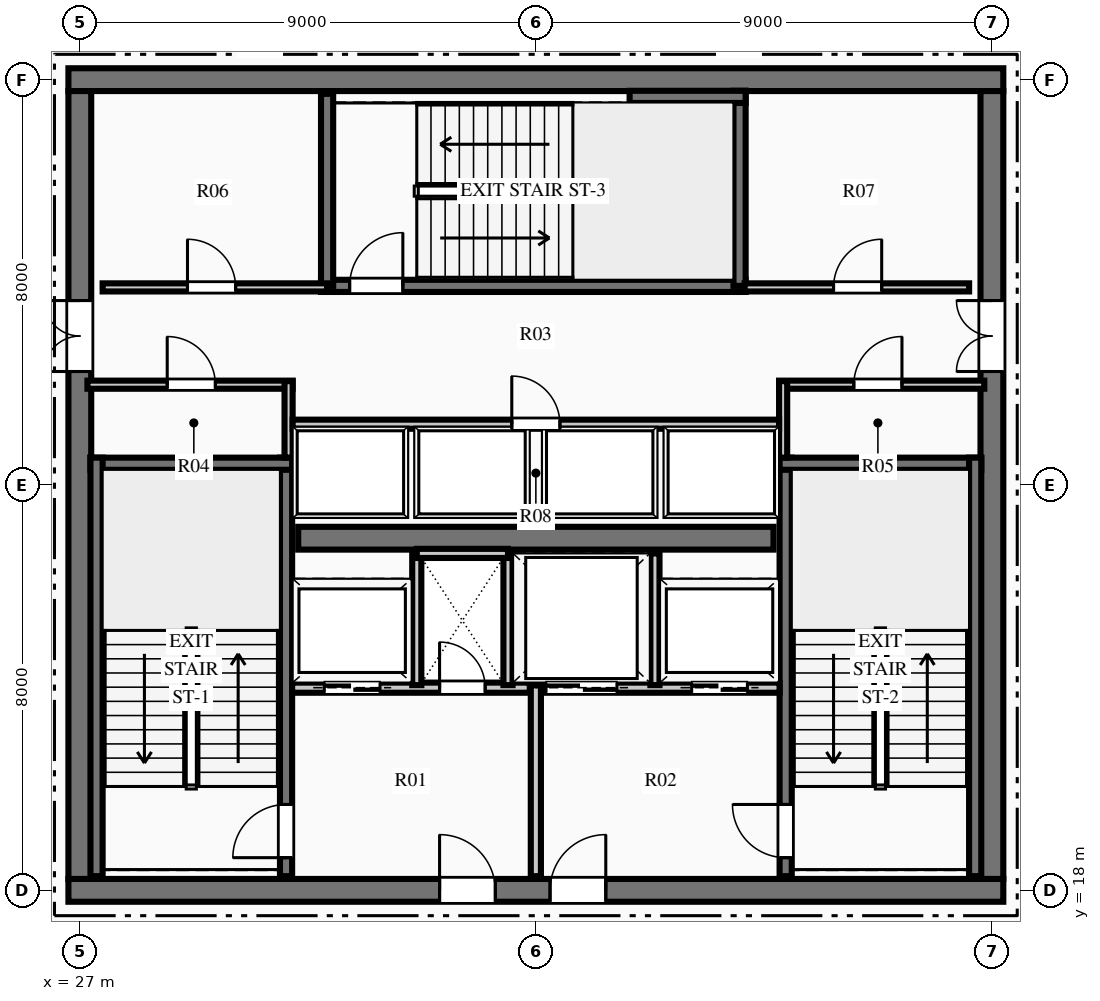
"""IFC4 building model, lengths in metres.
Left out: names, types, materials, properties, quantities, classifications, styles, units other than length and angle.
Written with IfcOpenShell. Run it as: python <this file> out.ifc"""

import sys

from ifc_helpers import new_model, si_unit, direction, frame, frame_2d, origin, place, context, subcontext, project, spatial, rectangle, extrude, element, fill, save


model = new_model("IFC4")
c1 = context("Model", 3, precision=1e-05, world=origin(), true_north=direction((0.0, 1.0)))
c2 = subcontext(c1, "Body", "Model", "MODEL_VIEW")
j1 = project(units=[si_unit("LENGTHUNIT", "METRE"), si_unit("PLANEANGLEUNIT", "RADIAN")], contexts=[c1])
p1 = place(None, origin())
s1 = spatial("IfcSite", under=j1, at=p1, CompositionType="ELEMENT")
p2 = place(p1, origin())
s2 = spatial("IfcBuilding", under=s1, at=p2, CompositionType="ELEMENT")
p3 = place(p2, frame((0.0, 0.0, 352.2)))
s3 = spatial("IfcBuildingStorey", under=s2, at=p3, CompositionType="ELEMENT", Elevation=352.2)
p4 = place(p3, frame((26.775, 18.0, 0.0), z_axis=(0.0, 0.0, 1.0), x_axis=(1.0, 0.0, 0.0)))
e1 = element("IfcWall", 1, at=p4, inside=s3, PredefinedType="SHEAR", context=c2, shape_type="SweptSolid", body=[
    extrude(rectangle(XDim=18.45, YDim=0.45, at=frame_2d((9.225, 0.0))), origin(), (0.0, 0.0, 1.0), 4.2),
])
p5 = place(p4, frame((7.325, 0.0, 0.0)))
e2 = element("IfcOpeningElement", 2, at=p5, cuts=e1, PredefinedType="OPENING", context=c2, shape_type="SweptSolid", body=[
    extrude(rectangle(XDim=1.1, YDim=2.15, at=frame_2d((0.55, 1.075))), frame((0.0, 0.235, 0.0), z_axis=(0.0, -1.0, 0.0), x_axis=(1.0, 0.0, 0.0)), (0.0, 0.0, 1.0), 0.47),
])
p6 = place(p4, frame((9.505, 0.0, 0.0)))
e3 = element("IfcOpeningElement", 3, at=p6, cuts=e1, PredefinedType="OPENING", context=c2, shape_type="SweptSolid", body=[
    extrude(rectangle(XDim=1.1, YDim=2.15, at=frame_2d((0.55, 1.075))), frame((0.0, 0.235, 0.0), z_axis=(0.0, -1.0, 0.0), x_axis=(1.0, 0.0, 0.0)), (0.0, 0.0, 1.0), 0.47),
])
p7 = place(p3, frame((26.775, 34.0, 0.0), z_axis=(0.0, 0.0, 1.0), x_axis=(1.0, 0.0, 0.0)))
e4 = element("IfcWall", 4, at=p7, inside=s3, PredefinedType="SHEAR", context=c2, shape_type="SweptSolid", body=[
    extrude(rectangle(XDim=18.45, YDim=0.45, at=frame_2d((9.225, 0.0))), origin(), (0.0, 0.0, 1.0), 4.2),
])
p8 = place(p3, frame((27.0, 18.225, 0.0), z_axis=(0.0, 0.0, 1.0), x_axis=(0.0, 1.0, 0.0)))
e5 = element("IfcWall", 5, at=p8, inside=s3, PredefinedType="SHEAR", context=c2, shape_type="SweptSolid", body=[
    extrude(rectangle(XDim=15.55, YDim=0.45, at=frame_2d((7.775, 0.0))), origin(), (0.0, 0.0, 1.0), 4.2),
])
p9 = place(p8, frame((10.015, 0.0, 0.0)))
e6 = element("IfcOpeningElement", 6, at=p9, cuts=e5, PredefinedType="OPENING", context=c2, shape_type="SweptSolid", body=[
    extrude(rectangle(XDim=1.4, YDim=2.2, at=frame_2d((0.7, 1.1))), frame((0.0, 0.235, 0.0), z_axis=(0.0, -1.0, 0.0), x_axis=(1.0, 0.0, 0.0)), (0.0, 0.0, 1.0), 0.47),
])
p10 = place(p3, frame((45.0, 18.225, 0.0), z_axis=(0.0, 0.0, 1.0), x_axis=(0.0, 1.0, 0.0)))
e7 = element("IfcWall", 7, at=p10, inside=s3, PredefinedType="SHEAR", context=c2, shape_type="SweptSolid", body=[
    extrude(rectangle(XDim=15.55, YDim=0.45, at=frame_2d((7.775, 0.0))), origin(), (0.0, 0.0, 1.0), 4.2),
])
p11 = place(p10, frame((10.015, 0.0, 0.0)))
e8 = element("IfcOpeningElement", 8, at=p11, cuts=e7, PredefinedType="OPENING", context=c2, shape_type="SweptSolid", body=[
    extrude(rectangle(XDim=1.4, YDim=2.2, at=frame_2d((0.7, 1.1))), frame((0.0, 0.235, 0.0), z_axis=(0.0, -1.0, 0.0), x_axis=(1.0, 0.0, 0.0)), (0.0, 0.0, 1.0), 0.47),
])
p12 = place(p3, frame((31.31, 24.95, 0.0), z_axis=(0.0, 0.0, 1.0), x_axis=(1.0, 0.0, 0.0)))
e9 = element("IfcWall", 9, at=p12, inside=s3, PredefinedType="SHEAR", context=c2, shape_type="SweptSolid", body=[
    extrude(rectangle(XDim=9.38, YDim=0.45, at=frame_2d((4.69, 0.0))), origin(), (0.0, 0.0, 1.0), 4.2),
])
p13 = place(p3, frame((31.07, 18.28, 0.0), z_axis=(0.0, 0.0, 1.0), x_axis=(0.0, 1.0, 0.0)))
e10 = element("IfcWall", 10, at=p13, inside=s3, PredefinedType="SHEAR", context=c2, shape_type="SweptSolid", body=[
    extrude(rectangle(XDim=8.26, YDim=0.24, at=frame_2d((4.13, 0.0))), origin(), (0.0, 0.0, 1.0), 4.2),
])
p14 = place(p13, frame((0.365, 0.0, 0.0)))
e11 = element("IfcOpeningElement", 11, at=p14, cuts=e10, PredefinedType="OPENING", context=c2, shape_type="SweptSolid", body=[
    extrude(rectangle(XDim=1.05, YDim=2.15, at=frame_2d((0.525, 1.075))), frame((0.0, 0.13, 0.0), z_axis=(0.0, -1.0, 0.0), x_axis=(1.0, 0.0, 0.0)), (0.0, 0.0, 1.0), 0.26),
])
p15 = place(p3, frame((27.21, 26.42, 0.0), z_axis=(0.0, 0.0, 1.0), x_axis=(1.0, 0.0, 0.0)))
e12 = element("IfcWall", 12, at=p15, inside=s3, PredefinedType="SHEAR", context=c2, shape_type="SweptSolid", body=[
    extrude(rectangle(XDim=3.98, YDim=0.24, at=frame_2d((1.99, 0.0))), origin(), (0.0, 0.0, 1.0), 4.2),
])
p16 = place(p3, frame((27.33, 18.28, 0.0), z_axis=(0.0, 0.0, 1.0), x_axis=(0.0, 1.0, 0.0)))
e13 = element("IfcWall", 13, at=p16, inside=s3, PredefinedType="SHEAR", context=c2, shape_type="SweptSolid", body=[
    extrude(rectangle(XDim=8.26, YDim=0.24, at=frame_2d((4.13, 0.0))), origin(), (0.0, 0.0, 1.0), 4.2),
])
p17 = place(p3, frame((40.93, 18.28, 0.0), z_axis=(0.0, 0.0, 1.0), x_axis=(0.0, 1.0, 0.0)))
e14 = element("IfcWall", 14, at=p17, inside=s3, PredefinedType="SHEAR", context=c2, shape_type="SweptSolid", body=[
    extrude(rectangle(XDim=8.26, YDim=0.24, at=frame_2d((4.13, 0.0))), origin(), (0.0, 0.0, 1.0), 4.2),
])
p18 = place(p17, frame((0.365, 0.0, 0.0)))
e15 = element("IfcOpeningElement", 15, at=p18, cuts=e14, PredefinedType="OPENING", context=c2, shape_type="SweptSolid", body=[
    extrude(rectangle(XDim=1.05, YDim=2.15, at=frame_2d((0.525, 1.075))), frame((0.0, 0.13, 0.0), z_axis=(0.0, -1.0, 0.0), x_axis=(1.0, 0.0, 0.0)), (0.0, 0.0, 1.0), 0.26),
])
p19 = place(p3, frame((40.81, 26.42, 0.0), z_axis=(0.0, 0.0, 1.0), x_axis=(1.0, 0.0, 0.0)))
e16 = element("IfcWall", 16, at=p19, inside=s3, PredefinedType="SHEAR", context=c2, shape_type="SweptSolid", body=[
    extrude(rectangle(XDim=3.98, YDim=0.24, at=frame_2d((1.99, 0.0))), origin(), (0.0, 0.0, 1.0), 4.2),
])
p20 = place(p3, frame((44.67, 18.28, 0.0), z_axis=(0.0, 0.0, 1.0), x_axis=(0.0, 1.0, 0.0)))
e17 = element("IfcWall", 17, at=p20, inside=s3, PredefinedType="SHEAR", context=c2, shape_type="SweptSolid", body=[
    extrude(rectangle(XDim=8.26, YDim=0.24, at=frame_2d((4.13, 0.0))), origin(), (0.0, 0.0, 1.0), 4.2),
])
p21 = place(p3, frame((31.76, 29.93, 0.0), z_axis=(0.0, 0.0, 1.0), x_axis=(1.0, 0.0, 0.0)))
e18 = element("IfcWall", 18, at=p21, inside=s3, PredefinedType="SHEAR", context=c2, shape_type="SweptSolid", body=[
    extrude(rectangle(XDim=8.38, YDim=0.24, at=frame_2d((4.19, 0.0))), origin(), (0.0, 0.0, 1.0), 4.2),
])
p22 = place(p21, frame((0.565, 0.0, 0.0)))
e19 = element("IfcOpeningElement", 19, at=p22, cuts=e18, PredefinedType="OPENING", context=c2, shape_type="SweptSolid", body=[
    extrude(rectangle(XDim=1.05, YDim=2.15, at=frame_2d((0.525, 1.075))), frame((0.0, 0.13, 0.0), z_axis=(0.0, -1.0, 0.0), x_axis=(1.0, 0.0, 0.0)), (0.0, 0.0, 1.0), 0.26),
])
p23 = place(p3, frame((31.88, 29.93, 0.0), z_axis=(0.0, 0.0, 1.0), x_axis=(0.0, 1.0, 0.0)))
e20 = element("IfcWall", 20, at=p23, inside=s3, PredefinedType="SHEAR", context=c2, shape_type="SweptSolid", body=[
    extrude(rectangle(XDim=3.79, YDim=0.24, at=frame_2d((1.895, 0.0))), origin(), (0.0, 0.0, 1.0), 4.2),
])
p24 = place(p3, frame((40.02, 29.93, 0.0), z_axis=(0.0, 0.0, 1.0), x_axis=(0.0, 1.0, 0.0)))
e21 = element("IfcWall", 21, at=p24, inside=s3, PredefinedType="SHEAR", context=c2, shape_type="SweptSolid", body=[
    extrude(rectangle(XDim=3.85, YDim=0.24, at=frame_2d((1.925, 0.0))), origin(), (0.0, 0.0, 1.0), 4.2),
])
p25 = place(p3, frame((37.85, 33.66, 0.0), z_axis=(0.0, 0.0, 1.0), x_axis=(1.0, 0.0, 0.0)))
e22 = element("IfcWall", 22, at=p25, inside=s3, PredefinedType="SHEAR", context=c2, shape_type="SweptSolid", body=[
    extrude(rectangle(XDim=2.29, YDim=0.24, at=frame_2d((1.145, 0.0))), origin(), (0.0, 0.0, 1.0), 4.2),
])
p26 = place(p3, frame((36.0, 18.28, 0.0), z_axis=(0.0, 0.0, 1.0), x_axis=(0.0, 1.0, 0.0)))
e23 = element("IfcWall", 23, at=p26, inside=s3, PredefinedType="PARTITIONING", context=c2, shape_type="SweptSolid", body=[
    extrude(rectangle(XDim=3.77, YDim=0.2, at=frame_2d((1.885, 0.0))), origin(), (0.0, 0.0, 1.0), 3.8),
])
p27 = place(p3, frame((31.19, 22.0, 0.0), z_axis=(0.0, 0.0, 1.0), x_axis=(1.0, 0.0, 0.0)))
e24 = element("IfcWall", 24, at=p27, inside=s3, PredefinedType="PARTITIONING", context=c2, shape_type="SweptSolid", body=[
    extrude(rectangle(XDim=4.69, YDim=0.2, at=frame_2d((2.345, 0.0))), origin(), (0.0, 0.0, 1.0), 3.8),
])
p28 = place(p27, frame((2.91, 0.0, 0.0)))
e25 = element("IfcOpeningElement", 25, at=p28, cuts=e24, PredefinedType="OPENING", context=c2, shape_type="SweptSolid", body=[
    extrude(rectangle(XDim=0.9, YDim=2.15, at=frame_2d((0.45, 1.075))), frame((0.0, 0.11, 0.0), z_axis=(0.0, -1.0, 0.0), x_axis=(1.0, 0.0, 0.0)), (0.0, 0.0, 1.0), 0.22),
])
p29 = place(p27, frame((0.635, 0.0, 0.0)))
e26 = element("IfcOpeningElement", 26, at=p29, cuts=e24, PredefinedType="OPENING", context=c2, shape_type="SweptSolid", body=[
    extrude(rectangle(XDim=1.1, YDim=2.15, at=frame_2d((0.55, 1.075))), frame((0.0, 0.11, 0.0), z_axis=(0.0, -1.0, 0.0), x_axis=(1.0, 0.0, 0.0)), (0.0, 0.0, 1.0), 0.22),
])
p30 = place(p3, frame((36.12, 22.0, 0.0), z_axis=(0.0, 0.0, 1.0), x_axis=(1.0, 0.0, 0.0)))
e27 = element("IfcWall", 27, at=p30, inside=s3, PredefinedType="PARTITIONING", context=c2, shape_type="SweptSolid", body=[
    extrude(rectangle(XDim=4.69, YDim=0.2, at=frame_2d((2.345, 0.0))), origin(), (0.0, 0.0, 1.0), 3.8),
])
p31 = place(p30, frame((2.955, 0.0, 0.0)))
e28 = element("IfcOpeningElement", 28, at=p31, cuts=e27, PredefinedType="OPENING", context=c2, shape_type="SweptSolid", body=[
    extrude(rectangle(XDim=1.1, YDim=2.15, at=frame_2d((0.55, 1.075))), frame((0.0, 0.11, 0.0), z_axis=(0.0, -1.0, 0.0), x_axis=(1.0, 0.0, 0.0)), (0.0, 0.0, 1.0), 0.22),
])
p32 = place(p30, frame((0.08, 0.0, 0.0)))
e29 = element("IfcOpeningElement", 29, at=p32, cuts=e27, PredefinedType="OPENING", context=c2, shape_type="SweptSolid", body=[
    extrude(rectangle(XDim=1.4, YDim=2.2, at=frame_2d((0.7, 1.1))), frame((0.0, 0.11, 0.0), z_axis=(0.0, -1.0, 0.0), x_axis=(1.0, 0.0, 0.0)), (0.0, 0.0, 1.0), 0.22),
])
for number, where, z_axis, x_axis in (
    (30, (33.65, 22.05, 0.0), (0.0, 0.0, 1.0), (0.0, 1.0, 0.0)),
    (31, (35.45, 22.05, 0.0), (0.0, 0.0, 1.0), (0.0, 1.0, 0.0)),
):
    element("IfcWall", number, at=place(p3, frame(where, z_axis=z_axis, x_axis=x_axis)), inside=s3, PredefinedType="PARTITIONING", context=c2, shape_type="SweptSolid", body=[
        extrude(rectangle(XDim=2.6, YDim=0.18, at=frame_2d((1.3, 0.0))), origin(), (0.0, 0.0, 1.0), 3.8),
    ])
p33 = place(p3, frame((33.65, 24.65, 0.0), z_axis=(0.0, 0.0, 1.0), x_axis=(1.0, 0.0, 0.0)))
e32 = element("IfcWall", 32, at=p33, inside=s3, PredefinedType="PARTITIONING", context=c2, shape_type="SweptSolid", body=[
    extrude(rectangle(XDim=1.8, YDim=0.18, at=frame_2d((0.9, 0.0))), origin(), (0.0, 0.0, 1.0), 3.8),
])
p34 = place(p3, frame((38.35, 22.05, 0.0), z_axis=(0.0, 0.0, 1.0), x_axis=(0.0, 1.0, 0.0)))
e33 = element("IfcWall", 33, at=p34, inside=s3, PredefinedType="PARTITIONING", context=c2, shape_type="SweptSolid", body=[
    extrude(rectangle(XDim=2.6, YDim=0.18, at=frame_2d((1.3, 0.0))), origin(), (0.0, 0.0, 1.0), 3.8),
])
p35 = place(p3, frame((27.15, 27.98, 0.0), z_axis=(0.0, 0.0, 1.0), x_axis=(1.0, 0.0, 0.0)))
e34 = element("IfcWall", 34, at=p35, inside=s3, PredefinedType="PARTITIONING", context=c2, shape_type="SweptSolid", body=[
    extrude(rectangle(XDim=4.05, YDim=0.16, at=frame_2d((2.025, 0.0))), origin(), (0.0, 0.0, 1.0), 3.8),
])
p36 = place(p35, frame((1.575, 0.0, 0.0)))
e35 = element("IfcOpeningElement", 35, at=p36, cuts=e34, PredefinedType="OPENING", context=c2, shape_type="SweptSolid", body=[
    extrude(rectangle(XDim=0.95, YDim=2.15, at=frame_2d((0.475, 1.075))), frame((0.0, 0.09, 0.0), z_axis=(0.0, -1.0, 0.0), x_axis=(1.0, 0.0, 0.0)), (0.0, 0.0, 1.0), 0.18),
])
p37 = place(p3, frame((31.12, 26.54, 0.0), z_axis=(0.0, 0.0, 1.0), x_axis=(0.0, 1.0, 0.0)))
e36 = element("IfcWall", 36, at=p37, inside=s3, PredefinedType="PARTITIONING", context=c2, shape_type="SweptSolid", body=[
    extrude(rectangle(XDim=1.51, YDim=0.16, at=frame_2d((0.755, 0.0))), origin(), (0.0, 0.0, 1.0), 3.8),
])
p38 = place(p3, frame((40.8, 27.98, 0.0), z_axis=(0.0, 0.0, 1.0), x_axis=(1.0, 0.0, 0.0)))
e37 = element("IfcWall", 37, at=p38, inside=s3, PredefinedType="PARTITIONING", context=c2, shape_type="SweptSolid", body=[
    extrude(rectangle(XDim=4.05, YDim=0.16, at=frame_2d((2.025, 0.0))), origin(), (0.0, 0.0, 1.0), 3.8),
])
p39 = place(p38, frame((1.475, 0.0, 0.0)))
e38 = element("IfcOpeningElement", 38, at=p39, cuts=e37, PredefinedType="OPENING", context=c2, shape_type="SweptSolid", body=[
    extrude(rectangle(XDim=0.95, YDim=2.15, at=frame_2d((0.475, 1.075))), frame((0.0, 0.09, 0.0), z_axis=(0.0, -1.0, 0.0), x_axis=(1.0, 0.0, 0.0)), (0.0, 0.0, 1.0), 0.18),
])
p40 = place(p3, frame((40.88, 26.54, 0.0), z_axis=(0.0, 0.0, 1.0), x_axis=(0.0, 1.0, 0.0)))
e39 = element("IfcWall", 39, at=p40, inside=s3, PredefinedType="PARTITIONING", context=c2, shape_type="SweptSolid", body=[
    extrude(rectangle(XDim=1.51, YDim=0.16, at=frame_2d((0.755, 0.0))), origin(), (0.0, 0.0, 1.0), 3.8),
])
p41 = place(p3, frame((27.45, 29.9, 0.0), z_axis=(0.0, 0.0, 1.0), x_axis=(1.0, 0.0, 0.0)))
e40 = element("IfcWall", 40, at=p41, inside=s3, PredefinedType="PARTITIONING", context=c2, shape_type="SweptSolid", body=[
    extrude(rectangle(XDim=4.43, YDim=0.16, at=frame_2d((2.215, 0.0))), origin(), (0.0, 0.0, 1.0), 3.8),
])
p42 = place(p41, frame((1.675, 0.0, 0.0)))
e41 = element("IfcOpeningElement", 41, at=p42, cuts=e40, PredefinedType="OPENING", context=c2, shape_type="SweptSolid", body=[
    extrude(rectangle(XDim=0.95, YDim=2.15, at=frame_2d((0.475, 1.075))), frame((0.0, 0.09, 0.0), z_axis=(0.0, -1.0, 0.0), x_axis=(1.0, 0.0, 0.0)), (0.0, 0.0, 1.0), 0.18),
])
p43 = place(p3, frame((40.12, 29.9, 0.0), z_axis=(0.0, 0.0, 1.0), x_axis=(1.0, 0.0, 0.0)))
e42 = element("IfcWall", 42, at=p43, inside=s3, PredefinedType="PARTITIONING", context=c2, shape_type="SweptSolid", body=[
    extrude(rectangle(XDim=4.43, YDim=0.16, at=frame_2d((2.215, 0.0))), origin(), (0.0, 0.0, 1.0), 3.8),
])
p44 = place(p43, frame((1.755, 0.0, 0.0)))
e43 = element("IfcOpeningElement", 43, at=p44, cuts=e42, PredefinedType="OPENING", context=c2, shape_type="SweptSolid", body=[
    extrude(rectangle(XDim=0.95, YDim=2.15, at=frame_2d((0.475, 1.075))), frame((0.0, 0.09, 0.0), z_axis=(0.0, -1.0, 0.0), x_axis=(1.0, 0.0, 0.0)), (0.0, 0.0, 1.0), 0.18),
])
p45 = place(p3, frame((31.2, 27.2, 0.0), z_axis=(0.0, 0.0, 1.0), x_axis=(1.0, 0.0, 0.0)))
e44 = element("IfcWall", 44, at=p45, inside=s3, PredefinedType="PARTITIONING", context=c2, shape_type="SweptSolid", body=[
    extrude(rectangle(XDim=9.6, YDim=0.18, at=frame_2d((4.8, 0.0))), origin(), (0.0, 0.0, 1.0), 3.8),
])
p46 = place(p45, frame((4.325, 0.0, 0.0)))
e45 = element("IfcOpeningElement", 45, at=p46, cuts=e44, PredefinedType="OPENING", context=c2, shape_type="SweptSolid", body=[
    extrude(rectangle(XDim=0.95, YDim=2.15, at=frame_2d((0.475, 1.075))), frame((0.0, 0.1, 0.0), z_axis=(0.0, -1.0, 0.0), x_axis=(1.0, 0.0, 0.0)), (0.0, 0.0, 1.0), 0.2),
])
p47 = place(p36, origin())
e46 = element("IfcDoor", 46, at=p47, inside=s3, OperationType="SINGLE_SWING_LEFT", PredefinedType="DOOR", context=c2, shape_type="SweptSolid", body=[
    extrude(rectangle(XDim=0.95, YDim=2.15, at=frame_2d((0.475, 1.075))), frame((0.0, 0.025, 0.0), z_axis=(0.0, -1.0, 0.0), x_axis=(1.0, 0.0, 0.0)), (0.0, 0.0, 1.0), 0.05),
])
fill(e35, e46)
p48 = place(p39, origin())
e47 = element("IfcDoor", 47, at=p48, inside=s3, OperationType="SINGLE_SWING_RIGHT", PredefinedType="DOOR", context=c2, shape_type="SweptSolid", body=[
    extrude(rectangle(XDim=0.95, YDim=2.15, at=frame_2d((0.475, 1.075))), frame((0.0, 0.025, 0.0), z_axis=(0.0, -1.0, 0.0), x_axis=(1.0, 0.0, 0.0)), (0.0, 0.0, 1.0), 0.05),
])
fill(e38, e47)
p49 = place(p42, origin())
e48 = element("IfcDoor", 48, at=p49, inside=s3, OperationType="SINGLE_SWING_LEFT", PredefinedType="DOOR", context=c2, shape_type="SweptSolid", body=[
    extrude(rectangle(XDim=0.95, YDim=2.15, at=frame_2d((0.475, 1.075))), frame((0.0, 0.025, 0.0), z_axis=(0.0, -1.0, 0.0), x_axis=(1.0, 0.0, 0.0)), (0.0, 0.0, 1.0), 0.05),
])
fill(e41, e48)
p50 = place(p44, origin())
e49 = element("IfcDoor", 49, at=p50, inside=s3, OperationType="SINGLE_SWING_RIGHT", PredefinedType="DOOR", context=c2, shape_type="SweptSolid", body=[
    extrude(rectangle(XDim=0.95, YDim=2.15, at=frame_2d((0.475, 1.075))), frame((0.0, 0.025, 0.0), z_axis=(0.0, -1.0, 0.0), x_axis=(1.0, 0.0, 0.0)), (0.0, 0.0, 1.0), 0.05),
])
fill(e43, e49)
p51 = place(p46, origin())
e50 = element("IfcDoor", 50, at=p51, inside=s3, OperationType="SINGLE_SWING_LEFT", PredefinedType="DOOR", context=c2, shape_type="SweptSolid", body=[
    extrude(rectangle(XDim=0.95, YDim=2.15, at=frame_2d((0.475, 1.075))), frame((0.0, 0.025, 0.0), z_axis=(0.0, -1.0, 0.0), x_axis=(1.0, 0.0, 0.0)), (0.0, 0.0, 1.0), 0.05),
])
fill(e45, e50)
p52 = place(p14, origin())
e51 = element("IfcDoor", 51, at=p52, inside=s3, OperationType="SINGLE_SWING_LEFT", PredefinedType="DOOR", context=c2, shape_type="SweptSolid", body=[
    extrude(rectangle(XDim=1.05, YDim=2.15, at=frame_2d((0.525, 1.075))), frame((0.0, 0.025, 0.0), z_axis=(0.0, -1.0, 0.0), x_axis=(1.0, 0.0, 0.0)), (0.0, 0.0, 1.0), 0.05),
])
fill(e11, e51)
p53 = place(p18, origin())
e52 = element("IfcDoor", 52, at=p53, inside=s3, OperationType="SINGLE_SWING_RIGHT", PredefinedType="DOOR", context=c2, shape_type="SweptSolid", body=[
    extrude(rectangle(XDim=1.05, YDim=2.15, at=frame_2d((0.525, 1.075))), frame((0.0, 0.025, 0.0), z_axis=(0.0, -1.0, 0.0), x_axis=(1.0, 0.0, 0.0)), (0.0, 0.0, 1.0), 0.05),
])
fill(e15, e52)
p54 = place(p22, origin())
e53 = element("IfcDoor", 53, at=p54, inside=s3, OperationType="SINGLE_SWING_RIGHT", PredefinedType="DOOR", context=c2, shape_type="SweptSolid", body=[
    extrude(rectangle(XDim=1.05, YDim=2.15, at=frame_2d((0.525, 1.075))), frame((0.0, 0.025, 0.0), z_axis=(0.0, -1.0, 0.0), x_axis=(1.0, 0.0, 0.0)), (0.0, 0.0, 1.0), 0.05),
])
fill(e19, e53)
p55 = place(p5, origin())
e54 = element("IfcDoor", 54, at=p55, inside=s3, OperationType="SINGLE_SWING_LEFT", PredefinedType="DOOR", context=c2, shape_type="SweptSolid", body=[
    extrude(rectangle(XDim=1.1, YDim=2.15, at=frame_2d((0.55, 1.075))), frame((0.0, 0.025, 0.0), z_axis=(0.0, -1.0, 0.0), x_axis=(1.0, 0.0, 0.0)), (0.0, 0.0, 1.0), 0.05),
])
fill(e2, e54)
p56 = place(p6, origin())
e55 = element("IfcDoor", 55, at=p56, inside=s3, OperationType="SINGLE_SWING_RIGHT", PredefinedType="DOOR", context=c2, shape_type="SweptSolid", body=[
    extrude(rectangle(XDim=1.1, YDim=2.15, at=frame_2d((0.55, 1.075))), frame((0.0, 0.025, 0.0), z_axis=(0.0, -1.0, 0.0), x_axis=(1.0, 0.0, 0.0)), (0.0, 0.0, 1.0), 0.05),
])
fill(e3, e55)
p57 = place(p28, origin())
e56 = element("IfcDoor", 56, at=p57, inside=s3, OperationType="SINGLE_SWING_LEFT", PredefinedType="DOOR", context=c2, shape_type="SweptSolid", body=[
    extrude(rectangle(XDim=0.9, YDim=2.15, at=frame_2d((0.45, 1.075))), frame((0.0, 0.025, 0.0), z_axis=(0.0, -1.0, 0.0), x_axis=(1.0, 0.0, 0.0)), (0.0, 0.0, 1.0), 0.05),
])
fill(e25, e56)
p58 = place(p9, origin())
e57 = element("IfcDoor", 57, at=p58, inside=s3, OperationType="DOUBLE_DOOR_SINGLE_SWING", PredefinedType="DOOR", context=c2, shape_type="SweptSolid", body=[
    extrude(rectangle(XDim=1.4, YDim=2.2, at=frame_2d((0.7, 1.1))), frame((0.0, 0.025, 0.0), z_axis=(0.0, -1.0, 0.0), x_axis=(1.0, 0.0, 0.0)), (0.0, 0.0, 1.0), 0.05),
])
fill(e6, e57)
p59 = place(p11, origin())
e58 = element("IfcDoor", 58, at=p59, inside=s3, OperationType="DOUBLE_DOOR_SINGLE_SWING", PredefinedType="DOOR", context=c2, shape_type="SweptSolid", body=[
    extrude(rectangle(XDim=1.4, YDim=2.2, at=frame_2d((0.7, 1.1))), frame((0.0, 0.025, 0.0), z_axis=(0.0, -1.0, 0.0), x_axis=(1.0, 0.0, 0.0)), (0.0, 0.0, 1.0), 0.05),
])
fill(e8, e58)
p60 = place(p29, origin())
e59 = element("IfcDoor", 59, at=p60, inside=s3, OperationType="SLIDING_TO_LEFT", PredefinedType="DOOR", context=c2, shape_type="SweptSolid", body=[
    extrude(rectangle(XDim=1.1, YDim=2.15, at=frame_2d((0.55, 1.075))), frame((0.0, 0.025, 0.0), z_axis=(0.0, -1.0, 0.0), x_axis=(1.0, 0.0, 0.0)), (0.0, 0.0, 1.0), 0.05),
])
fill(e26, e59)
p61 = place(p31, origin())
e60 = element("IfcDoor", 60, at=p61, inside=s3, OperationType="SLIDING_TO_LEFT", PredefinedType="DOOR", context=c2, shape_type="SweptSolid", body=[
    extrude(rectangle(XDim=1.1, YDim=2.15, at=frame_2d((0.55, 1.075))), frame((0.0, 0.025, 0.0), z_axis=(0.0, -1.0, 0.0), x_axis=(1.0, 0.0, 0.0)), (0.0, 0.0, 1.0), 0.05),
])
fill(e28, e60)
p62 = place(p32, origin())
e61 = element("IfcDoor", 61, at=p62, inside=s3, OperationType="SLIDING_TO_LEFT", PredefinedType="DOOR", context=c2, shape_type="SweptSolid", body=[
    extrude(rectangle(XDim=1.4, YDim=2.2, at=frame_2d((0.7, 1.1))), frame((0.0, 0.025, 0.0), z_axis=(0.0, -1.0, 0.0), x_axis=(1.0, 0.0, 0.0)), (0.0, 0.0, 1.0), 0.05),
])
fill(e29, e61)
save(model, sys.argv[1])
